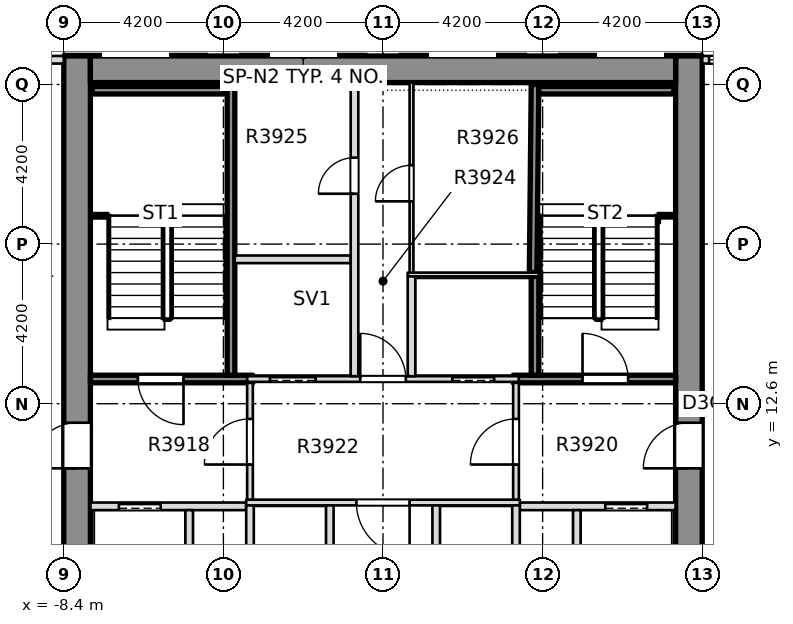
"""IFC4 building model, lengths in metres.
Left out: names, types, materials, properties, quantities, classifications, styles, units other than length and angle.
Written with IfcOpenShell. Run it as: python <this file> out.ifc"""

import sys

from ifc_helpers import new_model, si_unit, direction, frame, frame_2d, origin, place, context, subcontext, project, spatial, rectangle, extrude, element, fill, save


model = new_model("IFC4")
c1 = context("Model", 3, precision=1e-05, world=origin(), true_north=direction((0.0, 1.0)))
c2 = subcontext(c1, "Body", "Model", "MODEL_VIEW")
j1 = project(units=[si_unit("LENGTHUNIT", "METRE"), si_unit("PLANEANGLEUNIT", "RADIAN")], contexts=[c1])
p1 = place(None, origin())
s1 = spatial("IfcSite", under=j1, at=p1, CompositionType="ELEMENT")
p2 = place(p1, origin())
s2 = spatial("IfcBuilding", under=s1, at=p2, CompositionType="ELEMENT")
p3 = place(p2, frame((0.0, 0.0, 153.8)))
s3 = spatial("IfcBuildingStorey", under=s2, at=p3, CompositionType="ELEMENT", Elevation=153.8)
p4 = place(p3, frame((8.05, -8.4, -0.4), z_axis=(0.0, 0.0, 1.0), x_axis=(0.0, 1.0, 0.0)))
e1 = element("IfcWall", 1, at=p4, inside=s3, PredefinedType="SOLIDWALL", context=c2, shape_type="SweptSolid", body=[
    extrude(rectangle(XDim=30.15, YDim=0.7, at=frame_2d((15.075, 0.0))), origin(), (0.0, 0.0, 1.0), 3.45),
])
p5 = place(p4, frame((19.3, 0.0, 0.4)))
e2 = element("IfcOpeningElement", 2, at=p5, cuts=e1, PredefinedType="OPENING", context=c2, shape_type="SweptSolid", body=[
    extrude(rectangle(XDim=1.2, YDim=2.1, at=frame_2d((0.6, 1.05))), frame((0.0, 0.36, 0.0), z_axis=(0.0, -1.0, 0.0), x_axis=(1.0, 0.0, 0.0)), (0.0, 0.0, 1.0), 0.72),
])
p6 = place(p3, frame((-8.05, -8.4, -0.4), z_axis=(0.0, 0.0, 1.0), x_axis=(0.0, 1.0, 0.0)))
e3 = element("IfcWall", 3, at=p6, inside=s3, PredefinedType="SOLIDWALL", context=c2, shape_type="SweptSolid", body=[
    extrude(rectangle(XDim=30.15, YDim=0.7, at=frame_2d((15.075, 0.0))), origin(), (0.0, 0.0, 1.0), 3.45),
])
p7 = place(p6, frame((19.3, 0.0, 0.4)))
e4 = element("IfcOpeningElement", 4, at=p7, cuts=e3, PredefinedType="OPENING", context=c2, shape_type="SweptSolid", body=[
    extrude(rectangle(XDim=1.2, YDim=2.1, at=frame_2d((0.6, 1.05))), frame((0.0, 0.36, 0.0), z_axis=(0.0, -1.0, 0.0), x_axis=(1.0, 0.0, 0.0)), (0.0, 0.0, 1.0), 0.72),
])
p8 = place(p3, frame((-7.7, 21.4, -0.4), z_axis=(0.0, 0.0, 1.0), x_axis=(1.0, 0.0, 0.0)))
e5 = element("IfcWall", 5, at=p8, inside=s3, PredefinedType="SHEAR", context=c2, shape_type="SweptSolid", body=[
    extrude(rectangle(XDim=15.4, YDim=0.7, at=frame_2d((7.7, 0.0))), origin(), (0.0, 0.0, 1.0), 3.45),
])
p9 = place(p3, frame((12.05, 21.65, 0.0), z_axis=(0.0, 0.0, 1.0), x_axis=(-1.0, 0.0, 0.0)))
e6 = element("IfcWall", 6, at=p9, inside=s3, PredefinedType="STANDARD", context=c2, shape_type="SweptSolid", body=[
    extrude(rectangle(XDim=3.65, YDim=0.2, at=frame_2d((1.825, 0.0))), origin(), (0.0, 0.0, 1.0), 3.05),
])
p10 = place(p9, frame((1.67, 0.0, 0.2)))
e7 = element("IfcOpeningElement", 7, at=p10, cuts=e6, PredefinedType="OPENING", context=c2, shape_type="SweptSolid", body=[
    extrude(rectangle(XDim=1.8, YDim=2.65, at=frame_2d((0.9, 1.325))), frame((0.0, 0.11, 0.0), z_axis=(0.0, -1.0, 0.0), x_axis=(1.0, 0.0, 0.0)), (0.0, 0.0, 1.0), 0.22),
])
p11 = place(p3, frame((-8.4, 21.65, 0.0), z_axis=(0.0, 0.0, 1.0), x_axis=(-1.0, 0.0, 0.0)))
e8 = element("IfcWall", 8, at=p11, inside=s3, PredefinedType="STANDARD", context=c2, shape_type="SweptSolid", body=[
    extrude(rectangle(XDim=3.65, YDim=0.2, at=frame_2d((1.825, 0.0))), origin(), (0.0, 0.0, 1.0), 3.05),
])
p12 = place(p11, frame((0.375, 0.0, 0.2)))
e9 = element("IfcOpeningElement", 9, at=p12, cuts=e8, PredefinedType="OPENING", context=c2, shape_type="SweptSolid", body=[
    extrude(rectangle(XDim=1.8, YDim=2.65, at=frame_2d((0.9, 1.325))), frame((0.0, 0.11, 0.0), z_axis=(0.0, -1.0, 0.0), x_axis=(1.0, 0.0, 0.0)), (0.0, 0.0, 1.0), 0.22),
])
p13 = place(p3, frame((-7.699, 9.9, 0.0), z_axis=(0.0, 0.0, 1.0), x_axis=(1.0, 0.0, 0.0)))
e10 = element("IfcWall", 10, at=p13, inside=s3, PredefinedType="PARTITIONING", context=c2, shape_type="SweptSolid", body=[
    extrude(rectangle(XDim=4.099, YDim=0.2, at=frame_2d((2.049, 0.0))), origin(), (0.0, 0.0, 1.0), 3.05),
])
p14 = place(p13, frame((0.749, 0.0, 0.0)))
e11 = element("IfcOpeningElement", 11, at=p14, cuts=e10, PredefinedType="OPENING", context=c2, shape_type="SweptSolid", body=[
    extrude(rectangle(XDim=1.1, YDim=2.1, at=frame_2d((0.55, 1.05))), frame((0.0, 0.11, 0.0), z_axis=(0.0, -1.0, 0.0), x_axis=(1.0, 0.0, 0.0)), (0.0, 0.0, 1.0), 0.22),
])
p15 = place(p3, frame((3.6, 9.9, 0.0), z_axis=(0.0, 0.0, 1.0), x_axis=(1.0, 0.0, 0.0)))
e12 = element("IfcWall", 12, at=p15, inside=s3, PredefinedType="PARTITIONING", context=c2, shape_type="SweptSolid", body=[
    extrude(rectangle(XDim=4.099, YDim=0.2, at=frame_2d((2.049, 0.0))), origin(), (0.0, 0.0, 1.0), 3.05),
])
p16 = place(p15, frame((2.25, 0.0, 0.0)))
e13 = element("IfcOpeningElement", 13, at=p16, cuts=e12, PredefinedType="OPENING", context=c2, shape_type="SweptSolid", body=[
    extrude(rectangle(XDim=1.1, YDim=2.1, at=frame_2d((0.55, 1.05))), frame((0.0, 0.11, 0.0), z_axis=(0.0, -1.0, 0.0), x_axis=(1.0, 0.0, 0.0)), (0.0, 0.0, 1.0), 0.22),
])
p17 = place(p3, frame((-3.6, 10.0, 0.0), z_axis=(0.0, 0.0, 1.0), x_axis=(1.0, 0.0, 0.0)))
e14 = element("IfcWall", 14, at=p17, inside=s3, PredefinedType="PARTITIONING", context=c2, shape_type="SweptSolid", body=[
    extrude(rectangle(XDim=7.2, YDim=0.15, at=frame_2d((3.6, 0.0))), origin(), (0.0, 0.0, 1.0), 3.05),
])
p18 = place(p17, frame((2.9, 0.0, 0.0)))
e15 = element("IfcOpeningElement", 15, at=p18, cuts=e14, PredefinedType="OPENING", context=c2, shape_type="SweptSolid", body=[
    extrude(rectangle(XDim=1.4, YDim=2.1, at=frame_2d((0.7, 1.05))), frame((0.0, 0.085, 0.0), z_axis=(0.0, -1.0, 0.0), x_axis=(1.0, 0.0, 0.0)), (0.0, 0.0, 1.0), 0.17),
])
p19 = place(p3, frame((-7.699, 13.25, 0.0), z_axis=(0.0, 0.0, 1.0), x_axis=(1.0, 0.0, 0.0)))
e16 = element("IfcWall", 16, at=p19, inside=s3, PredefinedType="SOLIDWALL", context=c2, shape_type="SweptSolid", body=[
    extrude(rectangle(XDim=4.274, YDim=0.2, at=frame_2d((2.137, 0.0))), origin(), (0.0, 0.0, 1.0), 3.05),
])
p20 = place(p19, frame((1.249, 0.0, 0.0)))
e17 = element("IfcOpeningElement", 17, at=p20, cuts=e16, PredefinedType="OPENING", context=c2, shape_type="SweptSolid", body=[
    extrude(rectangle(XDim=1.2, YDim=2.1, at=frame_2d((0.6, 1.05))), frame((0.0, 0.11, 0.0), z_axis=(0.0, -1.0, 0.0), x_axis=(1.0, 0.0, 0.0)), (0.0, 0.0, 1.0), 0.22),
])
p21 = place(p3, frame((-3.575, 13.25, 0.0), z_axis=(0.0, 0.0, 1.0), x_axis=(1.0, 0.0, 0.0)))
e18 = element("IfcWall", 18, at=p21, inside=s3, PredefinedType="PARTITIONING", context=c2, shape_type="SweptSolid", body=[
    extrude(rectangle(XDim=7.15, YDim=0.15, at=frame_2d((3.575, 0.0))), origin(), (0.0, 0.0, 1.0), 3.05),
])
p22 = place(p21, frame((0.6, 0.0, 0.0)))
e19 = element("IfcOpeningElement", 19, at=p22, cuts=e18, PredefinedType="OPENING", context=c2, shape_type="SweptSolid", body=[
    extrude(rectangle(XDim=1.2, YDim=2.1, at=frame_2d((0.6, 1.05))), frame((0.0, 0.085, 0.0), z_axis=(0.0, -1.0, 0.0), x_axis=(1.0, 0.0, 0.0)), (0.0, 0.0, 1.0), 0.17),
])
p23 = place(p21, frame((5.4, 0.0, 0.0)))
e20 = element("IfcOpeningElement", 20, at=p23, cuts=e18, PredefinedType="OPENING", context=c2, shape_type="SweptSolid", body=[
    extrude(rectangle(XDim=1.1, YDim=2.1, at=frame_2d((0.55, 1.05))), frame((0.0, 0.085, 0.0), z_axis=(0.0, -1.0, 0.0), x_axis=(1.0, 0.0, 0.0)), (0.0, 0.0, 1.0), 0.17),
])
p24 = place(p21, frame((2.975, 0.0, 0.0)))
e21 = element("IfcOpeningElement", 21, at=p24, cuts=e18, PredefinedType="OPENING", context=c2, shape_type="SweptSolid", body=[
    extrude(rectangle(XDim=1.2, YDim=2.1, at=frame_2d((0.6, 1.05))), frame((0.0, 0.085, 0.0), z_axis=(0.0, -1.0, 0.0), x_axis=(1.0, 0.0, 0.0)), (0.0, 0.0, 1.0), 0.17),
])
p25 = place(p3, frame((3.425, 13.25, 0.0), z_axis=(0.0, 0.0, 1.0), x_axis=(1.0, 0.0, 0.0)))
e22 = element("IfcWall", 22, at=p25, inside=s3, PredefinedType="SOLIDWALL", context=c2, shape_type="SweptSolid", body=[
    extrude(rectangle(XDim=4.274, YDim=0.2, at=frame_2d((2.137, 0.0))), origin(), (0.0, 0.0, 1.0), 3.05),
])
p26 = place(p25, frame((1.825, 0.0, 0.0)))
e23 = element("IfcOpeningElement", 23, at=p26, cuts=e22, PredefinedType="OPENING", context=c2, shape_type="SweptSolid", body=[
    extrude(rectangle(XDim=1.2, YDim=2.1, at=frame_2d((0.6, 1.05))), frame((0.0, 0.11, 0.0), z_axis=(0.0, -1.0, 0.0), x_axis=(1.0, 0.0, 0.0)), (0.0, 0.0, 1.0), 0.22),
])
p27 = place(p3, frame((0.65, 16.0, 0.0), z_axis=(0.0, 0.0, 1.0), x_axis=(1.0, 0.0, 0.0)))
e24 = element("IfcWall", 24, at=p27, inside=s3, PredefinedType="PARTITIONING", context=c2, shape_type="SweptSolid", body=[
    extrude(rectangle(XDim=3.45, YDim=0.1, at=frame_2d((1.725, 0.0))), origin(), (0.0, 0.0, 1.0), 3.05),
])
p28 = place(p3, frame((-3.9, 16.4, 0.0), z_axis=(0.0, 0.0, 1.0), x_axis=(1.0, 0.0, 0.0)))
e25 = element("IfcWall", 25, at=p28, inside=s3, PredefinedType="PARTITIONING", context=c2, shape_type="SweptSolid", body=[
    extrude(rectangle(XDim=3.05, YDim=0.2, at=frame_2d((1.525, 0.0))), origin(), (0.0, 0.0, 1.0), 3.05),
])
p29 = place(p3, frame((-5.1, 7.075, 0.0), z_axis=(0.0, 0.0, 1.0), x_axis=(0.0, 1.0, 0.0)))
e26 = element("IfcWall", 26, at=p29, inside=s3, PredefinedType="PARTITIONING", context=c2, shape_type="SweptSolid", body=[
    extrude(rectangle(XDim=2.725, YDim=0.2, at=frame_2d((1.363, 0.0))), origin(), (0.0, 0.0, 1.0), 3.05),
])
p30 = place(p3, frame((-4.0, 13.35, 0.0), z_axis=(0.0, 0.0, 1.0), x_axis=(0.0, 1.0, 0.0)))
e27 = element("IfcWall", 27, at=p30, inside=s3, PredefinedType="SOLIDWALL", context=c2, shape_type="SweptSolid", body=[
    extrude(rectangle(XDim=7.699, YDim=0.2, at=frame_2d((3.85, 0.0))), origin(), (0.0, 0.0, 1.0), 3.05),
])
p31 = place(p3, frame((-3.5, 7.075, 0.0), z_axis=(0.0, 0.0, 1.0), x_axis=(0.0, 1.0, 0.0)))
e28 = element("IfcWall", 28, at=p31, inside=s3, PredefinedType="PARTITIONING", context=c2, shape_type="SweptSolid", body=[
    extrude(rectangle(XDim=2.85, YDim=0.2, at=frame_2d((1.425, 0.0))), origin(), (0.0, 0.0, 1.0), 3.05),
])
p32 = place(p3, frame((-3.5, 10.075, 0.0), z_axis=(0.0, 0.0, 1.0), x_axis=(0.0, 1.0, 0.0)))
e29 = element("IfcWall", 29, at=p32, inside=s3, PredefinedType="PARTITIONING", context=c2, shape_type="SweptSolid", body=[
    extrude(rectangle(XDim=3.075, YDim=0.15, at=frame_2d((1.538, 0.0))), origin(), (0.0, 0.0, 1.0), 3.05),
])
p33 = place(p32, frame((0.925, 0.0, 0.0)))
e30 = element("IfcOpeningElement", 30, at=p33, cuts=e29, PredefinedType="OPENING", context=c2, shape_type="SweptSolid", body=[
    extrude(rectangle(XDim=1.2, YDim=2.1, at=frame_2d((0.6, 1.05))), frame((0.0, 0.085, 0.0), z_axis=(0.0, -1.0, 0.0), x_axis=(1.0, 0.0, 0.0)), (0.0, 0.0, 1.0), 0.17),
])
p34 = place(p3, frame((-1.4, 7.075, 0.0), z_axis=(0.0, 0.0, 1.0), x_axis=(0.0, 1.0, 0.0)))
e31 = element("IfcWall", 31, at=p34, inside=s3, PredefinedType="PARTITIONING", context=c2, shape_type="SweptSolid", body=[
    extrude(rectangle(XDim=2.85, YDim=0.2, at=frame_2d((1.425, 0.0))), origin(), (0.0, 0.0, 1.0), 3.05),
])
p35 = place(p3, frame((-0.75, 13.325, 0.0), z_axis=(0.0, 0.0, 1.0), x_axis=(0.0, 1.0, 0.0)))
e32 = element("IfcWall", 32, at=p35, inside=s3, PredefinedType="PARTITIONING", context=c2, shape_type="SweptSolid", body=[
    extrude(rectangle(XDim=7.724, YDim=0.2, at=frame_2d((3.862, 0.0))), origin(), (0.0, 0.0, 1.0), 3.05),
])
p36 = place(p35, frame((4.8, 0.0, 0.0)))
e33 = element("IfcOpeningElement", 33, at=p36, cuts=e32, PredefinedType="OPENING", context=c2, shape_type="SweptSolid", body=[
    extrude(rectangle(XDim=0.95, YDim=2.1, at=frame_2d((0.475, 1.05))), frame((0.0, 0.11, 0.0), z_axis=(0.0, -1.0, 0.0), x_axis=(1.0, 0.0, 0.0)), (0.0, 0.0, 1.0), 0.22),
])
p37 = place(p3, frame((0.75, 13.325, 0.0), z_axis=(0.0, 0.0, 1.0), x_axis=(0.0, 1.0, 0.0)))
e34 = element("IfcWall", 34, at=p37, inside=s3, PredefinedType="PARTITIONING", context=c2, shape_type="SweptSolid", body=[
    extrude(rectangle(XDim=2.625, YDim=0.2, at=frame_2d((1.312, 0.0))), origin(), (0.0, 0.0, 1.0), 3.05),
])
p38 = place(p3, frame((0.75, 16.05, 0.0), z_axis=(0.0, 0.0, 1.0), x_axis=(0.0, 1.0, 0.0)))
e35 = element("IfcWall", 35, at=p38, inside=s3, PredefinedType="PARTITIONING", context=c2, shape_type="SweptSolid", body=[
    extrude(rectangle(XDim=4.999, YDim=0.1, at=frame_2d((2.5, 0.0))), origin(), (0.0, 0.0, 1.0), 3.05),
])
p39 = place(p38, frame((1.875, 0.0, 0.0)))
e36 = element("IfcOpeningElement", 36, at=p39, cuts=e35, PredefinedType="OPENING", context=c2, shape_type="SweptSolid", body=[
    extrude(rectangle(XDim=0.95, YDim=2.1, at=frame_2d((0.475, 1.05))), frame((0.0, 0.06, 0.0), z_axis=(0.0, -1.0, 0.0), x_axis=(1.0, 0.0, 0.0)), (0.0, 0.0, 1.0), 0.12),
])
for number, where, z_axis, x_axis in (
    (37, (1.4, 7.075, 0.0), (0.0, 0.0, 1.0), (0.0, 1.0, 0.0)),
    (38, (3.5, 7.075, 0.0), (0.0, 0.0, 1.0), (0.0, 1.0, 0.0)),
):
    element("IfcWall", number, at=place(p3, frame(where, z_axis=z_axis, x_axis=x_axis)), inside=s3, PredefinedType="PARTITIONING", context=c2, shape_type="SweptSolid", body=[
        extrude(rectangle(XDim=2.85, YDim=0.2, at=frame_2d((1.425, 0.0))), origin(), (0.0, 0.0, 1.0), 3.05),
    ])
p40 = place(p3, frame((3.5, 10.075, 0.0), z_axis=(0.0, 0.0, 1.0), x_axis=(0.0, 1.0, 0.0)))
e39 = element("IfcWall", 39, at=p40, inside=s3, PredefinedType="PARTITIONING", context=c2, shape_type="SweptSolid", body=[
    extrude(rectangle(XDim=3.075, YDim=0.15, at=frame_2d((1.538, 0.0))), origin(), (0.0, 0.0, 1.0), 3.05),
])
p41 = place(p40, frame((0.925, 0.0, 0.0)))
e40 = element("IfcOpeningElement", 40, at=p41, cuts=e39, PredefinedType="OPENING", context=c2, shape_type="SweptSolid", body=[
    extrude(rectangle(XDim=1.2, YDim=2.1, at=frame_2d((0.6, 1.05))), frame((0.0, 0.085, 0.0), z_axis=(0.0, -1.0, 0.0), x_axis=(1.0, 0.0, 0.0)), (0.0, 0.0, 1.0), 0.17),
])
p42 = place(p3, frame((4.0, 13.35, 0.0), z_axis=(0.0, 0.0, 1.0), x_axis=(0.0, 1.0, 0.0)))
e41 = element("IfcWall", 41, at=p42, inside=s3, PredefinedType="SOLIDWALL", context=c2, shape_type="SweptSolid", body=[
    extrude(rectangle(XDim=2.6, YDim=0.2, at=frame_2d((1.3, 0.0))), origin(), (0.0, 0.0, 1.0), 3.05),
])
p43 = place(p3, frame((3.95, 16.05, 0.0), z_axis=(0.0, 0.0, 1.0), x_axis=(0.010112452169, 0.999948867848, 0.0)))
e42 = element("IfcWall", 42, at=p43, inside=s3, PredefinedType="SOLIDWALL", context=c2, shape_type="SweptSolid", body=[
    extrude(rectangle(XDim=4.949, YDim=0.2, at=frame_2d((2.475, 0.0))), origin(), (0.0, 0.0, 1.0), 3.05),
])
p44 = place(p3, frame((5.1, 7.075, 0.0), z_axis=(0.0, 0.0, 1.0), x_axis=(0.0, 1.0, 0.0)))
e43 = element("IfcWall", 43, at=p44, inside=s3, PredefinedType="PARTITIONING", context=c2, shape_type="SweptSolid", body=[
    extrude(rectangle(XDim=2.725, YDim=0.2, at=frame_2d((1.363, 0.0))), origin(), (0.0, 0.0, 1.0), 3.05),
])
p45 = place(p3, frame((-7.65, 20.85, 0.0), z_axis=(0.0, 0.0, 1.0), x_axis=(1.0, 0.0, 0.0)))
e44 = element("IfcWall", 44, at=p45, inside=s3, PredefinedType="SOLIDWALL", context=c2, shape_type="SweptSolid", body=[
    extrude(rectangle(XDim=3.5, YDim=0.2, at=frame_2d((1.75, 0.0))), origin(), (0.0, 0.0, 1.0), 3.05),
])
p46 = place(p3, frame((4.1, 20.85, 0.0), z_axis=(0.0, 0.0, 1.0), x_axis=(1.0, 0.0, 0.0)))
e45 = element("IfcWall", 45, at=p46, inside=s3, PredefinedType="SOLIDWALL", context=c2, shape_type="SweptSolid", body=[
    extrude(rectangle(XDim=3.55, YDim=0.2, at=frame_2d((1.775, 0.0))), origin(), (0.0, 0.0, 1.0), 3.05),
])
p47 = place(p10, origin())
e46 = element("IfcWindow", 46, at=p47, inside=s3, PartitioningType="SINGLE_PANEL", PredefinedType="WINDOW", context=c2, shape_type="SweptSolid", body=[
    extrude(rectangle(XDim=1.8, YDim=2.65, at=frame_2d((0.9, 1.325))), frame((0.0, 0.03, 0.0), z_axis=(0.0, -1.0, 0.0), x_axis=(1.0, 0.0, 0.0)), (0.0, 0.0, 1.0), 0.06),
])
fill(e7, e46)
p48 = place(p20, origin())
e47 = element("IfcDoor", 47, at=p48, inside=s3, OperationType="SINGLE_SWING_LEFT", PredefinedType="DOOR", context=c2, shape_type="SweptSolid", body=[
    extrude(rectangle(XDim=1.2, YDim=2.1, at=frame_2d((0.6, 1.05))), frame((0.0, 0.025, 0.0), z_axis=(0.0, -1.0, 0.0), x_axis=(1.0, 0.0, 0.0)), (0.0, 0.0, 1.0), 0.05),
])
fill(e17, e47)
p49 = place(p14, origin())
e48 = element("IfcDoor", 48, at=p49, inside=s3, OperationType="SLIDING_TO_RIGHT", PredefinedType="DOOR", context=c2, shape_type="SweptSolid", body=[
    extrude(rectangle(XDim=1.1, YDim=2.1, at=frame_2d((0.55, 1.05))), frame((0.0, 0.025, 0.0), z_axis=(0.0, -1.0, 0.0), x_axis=(1.0, 0.0, 0.0)), (0.0, 0.0, 1.0), 0.05),
])
fill(e11, e48)
p50 = place(p26, origin())
e49 = element("IfcDoor", 49, at=p50, inside=s3, OperationType="SINGLE_SWING_RIGHT", PredefinedType="DOOR", context=c2, shape_type="SweptSolid", body=[
    extrude(rectangle(XDim=1.2, YDim=2.1, at=frame_2d((0.6, 1.05))), frame((0.0, 0.025, 0.0), z_axis=(0.0, -1.0, 0.0), x_axis=(1.0, 0.0, 0.0)), (0.0, 0.0, 1.0), 0.05),
])
fill(e23, e49)
p51 = place(p16, origin())
e50 = element("IfcDoor", 50, at=p51, inside=s3, OperationType="SLIDING_TO_LEFT", PredefinedType="DOOR", context=c2, shape_type="SweptSolid", body=[
    extrude(rectangle(XDim=1.1, YDim=2.1, at=frame_2d((0.55, 1.05))), frame((0.0, 0.025, 0.0), z_axis=(0.0, -1.0, 0.0), x_axis=(1.0, 0.0, 0.0)), (0.0, 0.0, 1.0), 0.05),
])
fill(e13, e50)
p52 = place(p18, origin())
e51 = element("IfcDoor", 51, at=p52, inside=s3, OperationType="SINGLE_SWING_RIGHT", PredefinedType="DOOR", context=c2, shape_type="SweptSolid", body=[
    extrude(rectangle(XDim=1.4, YDim=2.1, at=frame_2d((0.7, 1.05))), frame((0.0, 0.025, 0.0), z_axis=(0.0, -1.0, 0.0), x_axis=(1.0, 0.0, 0.0)), (0.0, 0.0, 1.0), 0.05),
])
fill(e15, e51)
p53 = place(p22, origin())
e52 = element("IfcDoor", 52, at=p53, inside=s3, OperationType="SLIDING_TO_RIGHT", PredefinedType="DOOR", context=c2, shape_type="SweptSolid", body=[
    extrude(rectangle(XDim=1.2, YDim=2.1, at=frame_2d((0.6, 1.05))), frame((0.0, 0.025, 0.0), z_axis=(0.0, -1.0, 0.0), x_axis=(1.0, 0.0, 0.0)), (0.0, 0.0, 1.0), 0.05),
])
fill(e19, e52)
p54 = place(p23, origin())
e53 = element("IfcDoor", 53, at=p54, inside=s3, OperationType="SLIDING_TO_LEFT", PredefinedType="DOOR", context=c2, shape_type="SweptSolid", body=[
    extrude(rectangle(XDim=1.1, YDim=2.1, at=frame_2d((0.55, 1.05))), frame((0.0, 0.025, 0.0), z_axis=(0.0, -1.0, 0.0), x_axis=(1.0, 0.0, 0.0)), (0.0, 0.0, 1.0), 0.05),
])
fill(e20, e53)
p55 = place(p24, origin())
e54 = element("IfcDoor", 54, at=p55, inside=s3, OperationType="SINGLE_SWING_RIGHT", PredefinedType="DOOR", context=c2, shape_type="SweptSolid", body=[
    extrude(rectangle(XDim=1.2, YDim=2.1, at=frame_2d((0.6, 1.05))), frame((0.0, 0.025, 0.0), z_axis=(0.0, -1.0, 0.0), x_axis=(1.0, 0.0, 0.0)), (0.0, 0.0, 1.0), 0.05),
])
fill(e21, e54)
p56 = place(p36, origin())
e55 = element("IfcDoor", 55, at=p56, inside=s3, OperationType="SINGLE_SWING_RIGHT", PredefinedType="DOOR", context=c2, shape_type="SweptSolid", body=[
    extrude(rectangle(XDim=0.95, YDim=2.1, at=frame_2d((0.475, 1.05))), frame((0.0, 0.025, 0.0), z_axis=(0.0, -1.0, 0.0), x_axis=(1.0, 0.0, 0.0)), (0.0, 0.0, 1.0), 0.05),
])
fill(e33, e55)
p57 = place(p39, origin())
e56 = element("IfcDoor", 56, at=p57, inside=s3, OperationType="SINGLE_SWING_LEFT", PredefinedType="DOOR", context=c2, shape_type="SweptSolid", body=[
    extrude(rectangle(XDim=0.95, YDim=2.1, at=frame_2d((0.475, 1.05))), frame((0.0, 0.025, 0.0), z_axis=(0.0, -1.0, 0.0), x_axis=(1.0, 0.0, 0.0)), (0.0, 0.0, 1.0), 0.05),
])
fill(e36, e56)
p58 = place(p33, origin())
e57 = element("IfcDoor", 57, at=p58, inside=s3, OperationType="SINGLE_SWING_RIGHT", PredefinedType="DOOR", context=c2, shape_type="SweptSolid", body=[
    extrude(rectangle(XDim=1.2, YDim=2.1, at=frame_2d((0.6, 1.05))), frame((0.0, 0.025, 0.0), z_axis=(0.0, -1.0, 0.0), x_axis=(1.0, 0.0, 0.0)), (0.0, 0.0, 1.0), 0.05),
])
fill(e30, e57)
p59 = place(p41, origin())
e58 = element("IfcDoor", 58, at=p59, inside=s3, OperationType="SINGLE_SWING_LEFT", PredefinedType="DOOR", context=c2, shape_type="SweptSolid", body=[
    extrude(rectangle(XDim=1.2, YDim=2.1, at=frame_2d((0.6, 1.05))), frame((0.0, 0.025, 0.0), z_axis=(0.0, -1.0, 0.0), x_axis=(1.0, 0.0, 0.0)), (0.0, 0.0, 1.0), 0.05),
])
fill(e40, e58)
p60 = place(p7, origin())
e59 = element("IfcDoor", 59, at=p60, inside=s3, OperationType="SINGLE_SWING_LEFT", PredefinedType="DOOR", context=c2, shape_type="SweptSolid", body=[
    extrude(rectangle(XDim=1.2, YDim=2.1, at=frame_2d((0.6, 1.05))), frame((0.0, 0.025, 0.0), z_axis=(0.0, -1.0, 0.0), x_axis=(1.0, 0.0, 0.0)), (0.0, 0.0, 1.0), 0.05),
])
fill(e4, e59)
p61 = place(p5, origin())
e60 = element("IfcDoor", 60, at=p61, inside=s3, OperationType="SINGLE_SWING_LEFT", PredefinedType="DOOR", context=c2, shape_type="SweptSolid", body=[
    extrude(rectangle(XDim=1.2, YDim=2.1, at=frame_2d((0.6, 1.05))), frame((0.0, 0.025, 0.0), z_axis=(0.0, -1.0, 0.0), x_axis=(1.0, 0.0, 0.0)), (0.0, 0.0, 1.0), 0.05),
])
fill(e2, e60)
save(model, sys.argv[1])
